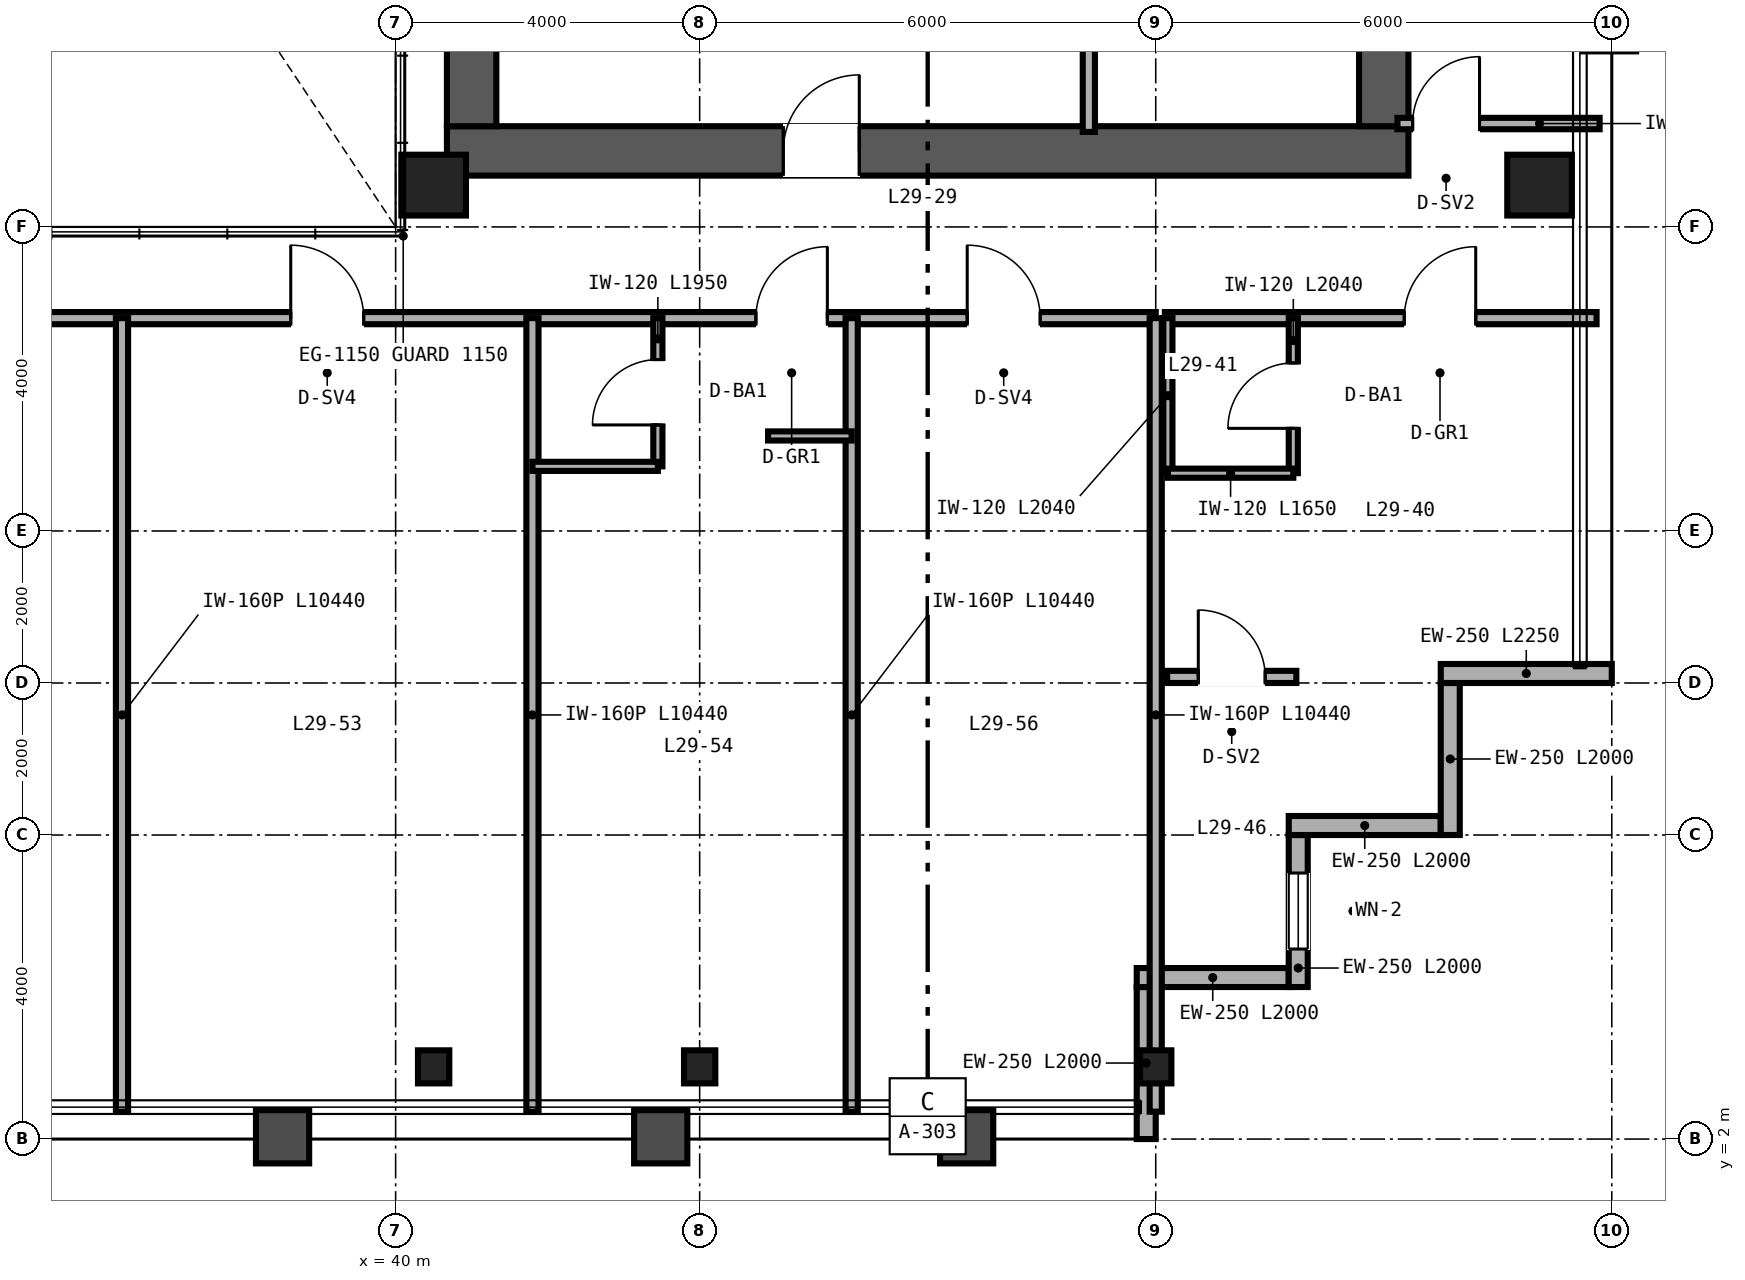
"""IFC4 building model, lengths in metres.
Left out: names, types, materials, properties, quantities, classifications, styles, units other than length and angle.
Written with IfcOpenShell. Run it as: python <this file> out.ifc"""

import sys

from ifc_helpers import new_model, si_unit, direction, frame, frame_2d, origin, origin_2d, place, context, subcontext, project, spatial, rectangle, hollow_rectangle, i_section, extrude, source, transform, mapped, element, fill, save


model = new_model("IFC4")
c1 = context("Model", 3, precision=1e-05, world=origin(), true_north=direction((0.0, 1.0)))
c2 = subcontext(c1, "Body", "Model", "MODEL_VIEW")
j1 = project(units=[si_unit("LENGTHUNIT", "METRE"), si_unit("PLANEANGLEUNIT", "RADIAN")], contexts=[c1])
p1 = place(None, origin())
s1 = spatial("IfcSite", under=j1, at=p1, CompositionType="ELEMENT")
p2 = place(p1, origin())
s2 = spatial("IfcBuilding", under=s1, at=p2, CompositionType="ELEMENT")
p3 = place(p2, frame((0.0, 0.0, 118.8)))
s3 = spatial("IfcBuildingStorey", under=s2, at=p3, CompositionType="ELEMENT", Elevation=118.8)
p4 = place(p3, frame((40.675, 15.0, 0.0), z_axis=(0.0, 0.0, 1.0), x_axis=(1.0, 0.0, 0.0)))
e1 = element("IfcWall", 1, at=p4, inside=s3, PredefinedType="SHEAR", context=c2, shape_type="SweptSolid", body=[
    extrude(rectangle(XDim=12.65, YDim=0.65, at=frame_2d((6.325, 0.0))), origin(), (0.0, 0.0, 1.0), 3.36),
])
p5 = place(p4, frame((4.425, 0.0, 0.0)))
e2 = element("IfcOpeningElement", 2, at=p5, cuts=e1, PredefinedType="OPENING", context=c2, shape_type="SweptSolid", body=[
    extrude(rectangle(XDim=1.0, YDim=2.15, at=frame_2d((0.5, 1.075))), frame((0.0, 0.335, 0.0), z_axis=(0.0, -1.0, 0.0), x_axis=(1.0, 0.0, 0.0)), (0.0, 0.0, 1.0), 0.67),
])
for number, where, z_axis, x_axis in (
    (3, (41.0, 15.325, 0.0), (0.0, 0.0, 1.0), (0.0, 1.0, 0.0)),
    (4, (53.0, 15.325, 0.0), (0.0, 0.0, 1.0), (0.0, 1.0, 0.0)),
):
    element("IfcWall", number, at=place(p3, frame(where, z_axis=z_axis, x_axis=x_axis)), inside=s3, PredefinedType="SHEAR", context=c2, shape_type="SweptSolid", body=[
        extrude(rectangle(XDim=21.35, YDim=0.65, at=frame_2d((10.675, 0.0))), origin(), (0.0, 0.0, 1.0), 3.36),
    ])
m1 = source(origin(), c2, "Body", "SweptSolid", [
    extrude(hollow_rectangle(XDim=0.85, YDim=0.8, WallThickness=0.032, at=origin_2d()), origin(), (0.0, 0.0, 1.0), 3.36),
])
for number, where, z_axis, x_axis in (
    (5, (40.5, 14.55, 0.0), (0.0, 0.0, 1.0), (1.0, 0.0, 0.0)),
    (6, (55.05, 14.55, 0.0), (0.0, 0.0, 1.0), (1.0, 0.0, 0.0)),
):
    element("IfcColumn", number, at=place(p3, frame(where, z_axis=z_axis, x_axis=x_axis)), inside=s3, PredefinedType="COLUMN", context=c2, shape_type="MappedRepresentation", body=[
        mapped(m1, transform((0.0, 0.0, 0.0), scale=1.0)),
    ])
m2 = source(origin(), c2, "Body", "SweptSolid", [
    extrude(i_section(OverallWidth=0.412, OverallDepth=0.435, WebThickness=0.036, FlangeThickness=0.057, FilletRadius=0.025, at=origin_2d()), origin(), (0.0, 0.0, 1.0), 3.36),
])
for number, where, z_axis, x_axis in (
    (7, (40.5, 2.95, 0.0), (0.0, 0.0, 1.0), (1.0, 0.0, 0.0)),
    (8, (44.0, 2.95, 0.0), (0.0, 0.0, 1.0), (1.0, 0.0, 0.0)),
    (9, (50.0, 2.95, 0.0), (0.0, 0.0, 1.0), (1.0, 0.0, 0.0)),
):
    element("IfcColumn", number, at=place(p3, frame(where, z_axis=z_axis, x_axis=x_axis)), inside=s3, PredefinedType="COLUMN", context=c2, shape_type="MappedRepresentation", body=[
        mapped(m2, transform((0.0, 0.0, 0.0), scale=1.0)),
    ])
p6 = place(p3, frame((49.875, 2.0, 0.0), z_axis=(0.0, 0.0, 1.0), x_axis=(0.0, 1.0, 0.0)))
e10 = element("IfcWall", 10, at=p6, inside=s3, PredefinedType="SOLIDWALL", context=c2, shape_type="SweptSolid", body=[
    extrude(rectangle(XDim=2.0, YDim=0.25, at=frame_2d((1.0, 0.0))), origin(), (0.0, 0.0, 1.0), 2.667),
])
p7 = place(p3, frame((49.75, 4.125, 0.0), z_axis=(0.0, 0.0, 1.0), x_axis=(1.0, 0.0, 0.0)))
e11 = element("IfcWall", 11, at=p7, inside=s3, PredefinedType="SOLIDWALL", context=c2, shape_type="SweptSolid", body=[
    extrude(rectangle(XDim=2.0, YDim=0.25, at=frame_2d((1.0, 0.0))), origin(), (0.0, 0.0, 1.0), 3.36),
])
p8 = place(p3, frame((51.875, 4.0, 0.0), z_axis=(0.0, 0.0, 1.0), x_axis=(0.0, 1.0, 0.0)))
e12 = element("IfcWall", 12, at=p8, inside=s3, PredefinedType="SOLIDWALL", context=c2, shape_type="SweptSolid", body=[
    extrude(rectangle(XDim=2.0, YDim=0.25, at=frame_2d((1.0, 0.0))), origin(), (0.0, 0.0, 1.0), 3.36),
])
p9 = place(p8, frame((0.5, 0.0, 0.85)))
e13 = element("IfcOpeningElement", 13, at=p9, cuts=e12, PredefinedType="OPENING", context=c2, shape_type="SweptSolid", body=[
    extrude(rectangle(XDim=1.0, YDim=1.9, at=frame_2d((0.5, 0.95))), frame((0.0, 0.135, 0.0), z_axis=(0.0, -1.0, 0.0), x_axis=(1.0, 0.0, 0.0)), (0.0, 0.0, 1.0), 0.27),
])
for number, where, z_axis, x_axis in (
    (14, (51.75, 6.125, 0.0), (0.0, 0.0, 1.0), (1.0, 0.0, 0.0)),
    (15, (53.875, 6.0, 0.0), (0.0, 0.0, 1.0), (0.0, 1.0, 0.0)),
):
    element("IfcWall", number, at=place(p3, frame(where, z_axis=z_axis, x_axis=x_axis)), inside=s3, PredefinedType="SOLIDWALL", context=c2, shape_type="SweptSolid", body=[
        extrude(rectangle(XDim=2.0, YDim=0.25, at=frame_2d((1.0, 0.0))), origin(), (0.0, 0.0, 1.0), 3.36),
    ])
p10 = place(p3, frame((53.75, 8.125, 0.0), z_axis=(0.0, 0.0, 1.0), x_axis=(1.0, 0.0, 0.0)))
e16 = element("IfcWall", 16, at=p10, inside=s3, PredefinedType="SOLIDWALL", context=c2, shape_type="SweptSolid", body=[
    extrude(rectangle(XDim=2.25, YDim=0.25, at=frame_2d((1.125, 0.0))), origin(), (0.0, 0.0, 1.0), 3.36),
])
p11 = place(p3, frame((49.12, 15.25, 0.0), z_axis=(0.0, 0.0, 1.0), x_axis=(0.0, 1.0, 0.0)))
e17 = element("IfcWall", 17, at=p11, inside=s3, PredefinedType="PARTITIONING", context=c2, shape_type="SweptSolid", body=[
    extrude(rectangle(XDim=16.13, YDim=0.16, at=frame_2d((8.065, 0.0))), origin(), (0.0, 0.0, 1.0), 2.36),
])
p12 = place(p11, frame((2.2, 0.0, 0.0)))
e18 = element("IfcOpeningElement", 18, at=p12, cuts=e17, PredefinedType="OPENING", context=c2, shape_type="SweptSolid", body=[
    extrude(rectangle(XDim=0.9, YDim=2.15, at=frame_2d((0.45, 1.075))), frame((0.0, 0.09, 0.0), z_axis=(0.0, -1.0, 0.0), x_axis=(1.0, 0.0, 0.0)), (0.0, 0.0, 1.0), 0.18),
])
p13 = place(p11, frame((8.2, 0.0, 0.0)))
e19 = element("IfcOpeningElement", 19, at=p13, cuts=e17, PredefinedType="OPENING", context=c2, shape_type="SweptSolid", body=[
    extrude(rectangle(XDim=0.9, YDim=2.15, at=frame_2d((0.45, 1.075))), frame((0.0, 0.09, 0.0), z_axis=(0.0, -1.0, 0.0), x_axis=(1.0, 0.0, 0.0)), (0.0, 0.0, 1.0), 0.18),
])
p14 = place(p11, frame((13.5, 0.0, 0.0)))
e20 = element("IfcOpeningElement", 20, at=p14, cuts=e17, PredefinedType="OPENING", context=c2, shape_type="SweptSolid", body=[
    extrude(rectangle(XDim=0.9, YDim=2.15, at=frame_2d((0.45, 1.075))), frame((0.0, 0.09, 0.0), z_axis=(0.0, -1.0, 0.0), x_axis=(1.0, 0.0, 0.0)), (0.0, 0.0, 1.0), 0.18),
])
p15 = place(p3, frame((53.18, 15.36, 0.0), z_axis=(0.0, 0.0, 1.0), x_axis=(1.0, 0.0, 0.0)))
e21 = element("IfcWall", 21, at=p15, inside=s3, PredefinedType="PARTITIONING", context=c2, shape_type="SweptSolid", body=[
    extrude(rectangle(XDim=2.66, YDim=0.15, at=frame_2d((1.33, 0.0))), origin(), (0.0, 0.0, 1.0), 2.581),
])
p16 = place(p15, frame((0.2, 0.0, 0.0)))
e22 = element("IfcOpeningElement", 22, at=p16, cuts=e21, PredefinedType="OPENING", context=c2, shape_type="SweptSolid", body=[
    extrude(rectangle(XDim=0.88, YDim=2.15, at=frame_2d((0.44, 1.075))), frame((0.0, 0.085, 0.0), z_axis=(0.0, -1.0, 0.0), x_axis=(1.0, 0.0, 0.0)), (0.0, 0.0, 1.0), 0.17),
])
p17 = place(p3, frame((50.12, 12.8, 0.0), z_axis=(0.0, 0.0, 1.0), x_axis=(1.0, 0.0, 0.0)))
e23 = element("IfcWall", 23, at=p17, inside=s3, PredefinedType="PARTITIONING", context=c2, shape_type="SweptSolid", body=[
    extrude(rectangle(XDim=5.68, YDim=0.16, at=frame_2d((2.84, 0.0))), origin(), (0.0, 0.0, 1.0), 3.36),
])
p18 = place(p17, frame((3.15, 0.0, 0.0)))
e24 = element("IfcOpeningElement", 24, at=p18, cuts=e23, PredefinedType="OPENING", context=c2, shape_type="SweptSolid", body=[
    extrude(rectangle(XDim=0.94, YDim=2.15, at=frame_2d((0.47, 1.075))), frame((0.0, 0.09, 0.0), z_axis=(0.0, -1.0, 0.0), x_axis=(1.0, 0.0, 0.0)), (0.0, 0.0, 1.0), 0.18),
])
p19 = place(p3, frame((51.81, 10.76, 0.0), z_axis=(0.0, 0.0, 1.0), x_axis=(0.0, 1.0, 0.0)))
e25 = element("IfcWall", 25, at=p19, inside=s3, PredefinedType="PARTITIONING", context=c2, shape_type="SweptSolid", body=[
    extrude(rectangle(XDim=2.04, YDim=0.12, at=frame_2d((1.02, 0.0))), origin(), (0.0, 0.0, 1.0), 3.36),
])
p20 = place(p19, frame((0.59, 0.0, 0.0)))
e26 = element("IfcOpeningElement", 26, at=p20, cuts=e25, PredefinedType="OPENING", context=c2, shape_type="SweptSolid", body=[
    extrude(rectangle(XDim=0.86, YDim=2.1, at=frame_2d((0.43, 1.05))), frame((0.0, 0.07, 0.0), z_axis=(0.0, -1.0, 0.0), x_axis=(1.0, 0.0, 0.0)), (0.0, 0.0, 1.0), 0.14),
])
p21 = place(p3, frame((50.16, 10.76, 0.0), z_axis=(0.0, 0.0, 1.0), x_axis=(0.0, 1.0, 0.0)))
e27 = element("IfcWall", 27, at=p21, inside=s3, PredefinedType="PARTITIONING", context=c2, shape_type="SweptSolid", body=[
    extrude(rectangle(XDim=2.04, YDim=0.12, at=frame_2d((1.02, 0.0))), origin(), (0.0, 0.0, 1.0), 3.36),
])
p22 = place(p3, frame((50.16, 10.76, 0.0), z_axis=(0.0, 0.0, 1.0), x_axis=(1.0, 0.0, 0.0)))
e28 = element("IfcWall", 28, at=p22, inside=s3, PredefinedType="PARTITIONING", context=c2, shape_type="SweptSolid", body=[
    extrude(rectangle(XDim=1.65, YDim=0.12, at=frame_2d((0.825, 0.0))), origin(), (0.0, 0.0, 1.0), 3.36),
])
p23 = place(p3, frame((50.15, 8.08, 0.0), z_axis=(0.0, 0.0, 1.0), x_axis=(1.0, 0.0, 0.0)))
e29 = element("IfcWall", 29, at=p23, inside=s3, PredefinedType="PARTITIONING", context=c2, shape_type="SweptSolid", body=[
    extrude(rectangle(XDim=1.7, YDim=0.16, at=frame_2d((0.85, 0.0))), origin(), (0.0, 0.0, 1.0), 3.36),
])
p24 = place(p23, frame((0.41, 0.0, 0.0)))
e30 = element("IfcOpeningElement", 30, at=p24, cuts=e29, PredefinedType="OPENING", context=c2, shape_type="SweptSolid", body=[
    extrude(rectangle(XDim=0.88, YDim=2.15, at=frame_2d((0.44, 1.075))), frame((0.0, 0.09, 0.0), z_axis=(0.0, -1.0, 0.0), x_axis=(1.0, 0.0, 0.0)), (0.0, 0.0, 1.0), 0.18),
])
p25 = place(p3, frame((14.0, 12.8, 0.0), z_axis=(0.0, 0.0, 1.0), x_axis=(1.0, 0.0, 0.0)))
e31 = element("IfcWall", 31, at=p25, inside=s3, PredefinedType="PARTITIONING", context=c2, shape_type="SweptSolid", body=[
    extrude(rectangle(XDim=36.0, YDim=0.16, at=frame_2d((18.0, 0.0))), origin(), (0.0, 0.0, 1.0), 2.581),
])
p26 = place(p25, frame((4.14, 0.0, 0.0)))
e32 = element("IfcOpeningElement", 32, at=p26, cuts=e31, PredefinedType="OPENING", context=c2, shape_type="SweptSolid", body=[
    extrude(rectangle(XDim=0.94, YDim=2.15, at=frame_2d((0.47, 1.075))), frame((0.0, 0.09, 0.0), z_axis=(0.0, -1.0, 0.0), x_axis=(1.0, 0.0, 0.0)), (0.0, 0.0, 1.0), 0.18),
])
p27 = place(p25, frame((9.54, 0.0, 0.0)))
e33 = element("IfcOpeningElement", 33, at=p27, cuts=e31, PredefinedType="OPENING", context=c2, shape_type="SweptSolid", body=[
    extrude(rectangle(XDim=0.94, YDim=2.15, at=frame_2d((0.47, 1.075))), frame((0.0, 0.09, 0.0), z_axis=(0.0, -1.0, 0.0), x_axis=(1.0, 0.0, 0.0)), (0.0, 0.0, 1.0), 0.18),
])
p28 = place(p25, frame((13.22, 0.0, 0.0)))
e34 = element("IfcOpeningElement", 34, at=p28, cuts=e31, PredefinedType="OPENING", context=c2, shape_type="SweptSolid", body=[
    extrude(rectangle(XDim=0.96, YDim=2.15, at=frame_2d((0.48, 1.075))), frame((0.0, 0.09, 0.0), z_axis=(0.0, -1.0, 0.0), x_axis=(1.0, 0.0, 0.0)), (0.0, 0.0, 1.0), 0.18),
])
p29 = place(p25, frame((19.02, 0.0, 0.0)))
e35 = element("IfcOpeningElement", 35, at=p29, cuts=e31, PredefinedType="OPENING", context=c2, shape_type="SweptSolid", body=[
    extrude(rectangle(XDim=0.96, YDim=2.15, at=frame_2d((0.48, 1.075))), frame((0.0, 0.09, 0.0), z_axis=(0.0, -1.0, 0.0), x_axis=(1.0, 0.0, 0.0)), (0.0, 0.0, 1.0), 0.18),
])
p30 = place(p25, frame((24.62, 0.0, 0.0)))
e36 = element("IfcOpeningElement", 36, at=p30, cuts=e31, PredefinedType="OPENING", context=c2, shape_type="SweptSolid", body=[
    extrude(rectangle(XDim=0.96, YDim=2.15, at=frame_2d((0.48, 1.075))), frame((0.0, 0.09, 0.0), z_axis=(0.0, -1.0, 0.0), x_axis=(1.0, 0.0, 0.0)), (0.0, 0.0, 1.0), 0.18),
])
p31 = place(p25, frame((30.74, 0.0, 0.0)))
e37 = element("IfcOpeningElement", 37, at=p31, cuts=e31, PredefinedType="OPENING", context=c2, shape_type="SweptSolid", body=[
    extrude(rectangle(XDim=0.94, YDim=2.15, at=frame_2d((0.47, 1.075))), frame((0.0, 0.09, 0.0), z_axis=(0.0, -1.0, 0.0), x_axis=(1.0, 0.0, 0.0)), (0.0, 0.0, 1.0), 0.18),
])
p32 = place(p25, frame((33.52, 0.0, 0.0)))
e38 = element("IfcOpeningElement", 38, at=p32, cuts=e31, PredefinedType="OPENING", context=c2, shape_type="SweptSolid", body=[
    extrude(rectangle(XDim=0.96, YDim=2.15, at=frame_2d((0.48, 1.075))), frame((0.0, 0.09, 0.0), z_axis=(0.0, -1.0, 0.0), x_axis=(1.0, 0.0, 0.0)), (0.0, 0.0, 1.0), 0.18),
])
p33 = place(p3, frame((50.0, 2.36, 0.0), z_axis=(0.0, 0.0, 1.0), x_axis=(0.0, 1.0, 0.0)))
e39 = element("IfcWall", 39, at=p33, inside=s3, PredefinedType="PARTITIONING", context=c2, shape_type="SweptSolid", body=[
    extrude(rectangle(XDim=10.44, YDim=0.16, at=frame_2d((5.22, 0.0))), origin(), (0.0, 0.0, 1.0), 2.667),
])
p34 = place(p3, frame((36.4, 2.36, 0.0), z_axis=(0.0, 0.0, 1.0), x_axis=(0.0, 1.0, 0.0)))
e40 = element("IfcWall", 40, at=p34, inside=s3, PredefinedType="PARTITIONING", context=c2, shape_type="SweptSolid", body=[
    extrude(rectangle(XDim=10.44, YDim=0.16, at=frame_2d((5.22, 0.0))), origin(), (0.0, 0.0, 1.0), 2.433),
])
p35 = place(p3, frame((41.8, 2.36, 0.0), z_axis=(0.0, 0.0, 1.0), x_axis=(0.0, 1.0, 0.0)))
e41 = element("IfcWall", 41, at=p35, inside=s3, PredefinedType="PARTITIONING", context=c2, shape_type="SweptSolid", body=[
    extrude(rectangle(XDim=10.44, YDim=0.16, at=frame_2d((5.22, 0.0))), origin(), (0.0, 0.0, 1.0), 2.823),
])
p36 = place(p3, frame((46.0, 2.36, 0.0), z_axis=(0.0, 0.0, 1.0), x_axis=(0.0, 1.0, 0.0)))
e42 = element("IfcWall", 42, at=p36, inside=s3, PredefinedType="PARTITIONING", context=c2, shape_type="SweptSolid", body=[
    extrude(rectangle(XDim=10.44, YDim=0.16, at=frame_2d((5.22, 0.0))), origin(), (0.0, 0.0, 1.0), 2.667),
])
p37 = place(p3, frame((43.45, 10.85, 0.0), z_axis=(0.0, 0.0, 1.0), x_axis=(0.0, 1.0, 0.0)))
e43 = element("IfcWall", 43, at=p37, inside=s3, PredefinedType="PARTITIONING", context=c2, shape_type="SweptSolid", body=[
    extrude(rectangle(XDim=1.95, YDim=0.12, at=frame_2d((0.975, 0.0))), origin(), (0.0, 0.0, 1.0), 3.36),
])
p38 = place(p37, frame((0.545, 0.0, 0.0)))
e44 = element("IfcOpeningElement", 44, at=p38, cuts=e43, PredefinedType="OPENING", context=c2, shape_type="SweptSolid", body=[
    extrude(rectangle(XDim=0.86, YDim=2.1, at=frame_2d((0.43, 1.05))), frame((0.0, 0.07, 0.0), z_axis=(0.0, -1.0, 0.0), x_axis=(1.0, 0.0, 0.0)), (0.0, 0.0, 1.0), 0.14),
])
p39 = place(p3, frame((41.8, 10.85, 0.0), z_axis=(0.0, 0.0, 1.0), x_axis=(1.0, 0.0, 0.0)))
e45 = element("IfcWall", 45, at=p39, inside=s3, PredefinedType="PARTITIONING", context=c2, shape_type="SweptSolid", body=[
    extrude(rectangle(XDim=1.65, YDim=0.12, at=frame_2d((0.825, 0.0))), origin(), (0.0, 0.0, 1.0), 3.36),
])
p40 = place(p3, frame((44.9, 11.25, 0.0), z_axis=(0.0, 0.0, 1.0), x_axis=(1.0, 0.0, 0.0)))
e46 = element("IfcWall", 46, at=p40, inside=s3, PredefinedType="PARTITIONING", context=c2, shape_type="SweptSolid", body=[
    extrude(rectangle(XDim=1.1, YDim=0.12, at=frame_2d((0.55, 0.0))), origin(), (0.0, 0.0, 1.0), 3.36),
])
m3 = source(origin(), c2, "Body", "SweptSolid", [
    extrude(rectangle(XDim=1.0, YDim=1.9, at=frame_2d((0.5, 0.95))), frame((0.0, 0.03, 0.0), z_axis=(0.0, -1.0, 0.0), x_axis=(1.0, 0.0, 0.0)), (0.0, 0.0, 1.0), 0.06),
])
p41 = place(p9, origin())
e47 = element("IfcWindow", 47, at=p41, inside=s3, PartitioningType="SINGLE_PANEL", PredefinedType="WINDOW", context=c2, shape_type="MappedRepresentation", body=[
    mapped(m3, transform((0.0, 0.0, 0.0), scale=1.0)),
])
fill(e13, e47)
m4 = source(origin(), c2, "Body", "SweptSolid", [
    extrude(rectangle(XDim=1.0, YDim=2.15, at=frame_2d((0.5, 1.075))), frame((0.0, 0.025, 0.0), z_axis=(0.0, -1.0, 0.0), x_axis=(1.0, 0.0, 0.0)), (0.0, 0.0, 1.0), 0.05),
])
p42 = place(p5, origin())
e48 = element("IfcDoor", 48, at=p42, inside=s3, OperationType="SINGLE_SWING_RIGHT", PredefinedType="DOOR", context=c2, shape_type="MappedRepresentation", body=[
    mapped(m4, transform((0.0, 0.0, 0.0), scale=1.0)),
])
fill(e2, e48)
m5 = source(origin(), c2, "Body", "SweptSolid", [
    extrude(rectangle(XDim=0.88, YDim=2.15, at=frame_2d((0.44, 1.075))), frame((0.0, 0.025, 0.0), z_axis=(0.0, -1.0, 0.0), x_axis=(1.0, 0.0, 0.0)), (0.0, 0.0, 1.0), 0.05),
])
p43 = place(p16, origin())
e49 = element("IfcDoor", 49, at=p43, inside=s3, OperationType="SINGLE_SWING_RIGHT", PredefinedType="DOOR", context=c2, shape_type="MappedRepresentation", body=[
    mapped(m5, transform((0.0, 0.0, 0.0), scale=1.0)),
])
fill(e22, e49)
m6 = source(origin(), c2, "Body", "SweptSolid", [
    extrude(rectangle(XDim=0.86, YDim=2.1, at=frame_2d((0.43, 1.05))), frame((0.0, 0.025, 0.0), z_axis=(0.0, -1.0, 0.0), x_axis=(1.0, 0.0, 0.0)), (0.0, 0.0, 1.0), 0.05),
])
p44 = place(p20, origin())
e50 = element("IfcDoor", 50, at=p44, inside=s3, OperationType="SINGLE_SWING_LEFT", PredefinedType="DOOR", context=c2, shape_type="MappedRepresentation", body=[
    mapped(m6, transform((0.0, 0.0, 0.0), scale=1.0)),
])
fill(e26, e50)
m7 = source(origin(), c2, "Body", "SweptSolid", [
    extrude(rectangle(XDim=0.94, YDim=2.15, at=frame_2d((0.47, 1.075))), frame((0.0, 0.025, 0.0), z_axis=(0.0, -1.0, 0.0), x_axis=(1.0, 0.0, 0.0)), (0.0, 0.0, 1.0), 0.05),
])
p45 = place(p18, origin())
e51 = element("IfcDoor", 51, at=p45, inside=s3, OperationType="SINGLE_SWING_RIGHT", PredefinedType="DOOR", context=c2, shape_type="MappedRepresentation", body=[
    mapped(m7, transform((0.0, 0.0, 0.0), scale=1.0)),
])
fill(e24, e51)
p46 = place(p24, origin())
e52 = element("IfcDoor", 52, at=p46, inside=s3, OperationType="SINGLE_SWING_LEFT", PredefinedType="DOOR", context=c2, shape_type="MappedRepresentation", body=[
    mapped(m5, transform((0.0, 0.0, 0.0), scale=1.0)),
])
fill(e30, e52)
p47 = place(p38, origin())
e53 = element("IfcDoor", 53, at=p47, inside=s3, OperationType="SINGLE_SWING_LEFT", PredefinedType="DOOR", context=c2, shape_type="MappedRepresentation", body=[
    mapped(m6, transform((0.0, 0.0, 0.0), scale=1.0)),
])
fill(e44, e53)
m8 = source(origin(), c2, "Body", "SweptSolid", [
    extrude(rectangle(XDim=0.96, YDim=2.15, at=frame_2d((0.48, 1.075))), frame((0.0, 0.025, 0.0), z_axis=(0.0, -1.0, 0.0), x_axis=(1.0, 0.0, 0.0)), (0.0, 0.0, 1.0), 0.05),
])
p48 = place(p30, origin())
e54 = element("IfcDoor", 54, at=p48, inside=s3, OperationType="SINGLE_SWING_LEFT", PredefinedType="DOOR", context=c2, shape_type="MappedRepresentation", body=[
    mapped(m8, transform((0.0, 0.0, 0.0), scale=1.0)),
])
fill(e36, e54)
p49 = place(p31, origin())
e55 = element("IfcDoor", 55, at=p49, inside=s3, OperationType="SINGLE_SWING_RIGHT", PredefinedType="DOOR", context=c2, shape_type="MappedRepresentation", body=[
    mapped(m7, transform((0.0, 0.0, 0.0), scale=1.0)),
])
fill(e37, e55)
p50 = place(p32, origin())
e56 = element("IfcDoor", 56, at=p50, inside=s3, OperationType="SINGLE_SWING_LEFT", PredefinedType="DOOR", context=c2, shape_type="MappedRepresentation", body=[
    mapped(m8, transform((0.0, 0.0, 0.0), scale=1.0)),
])
fill(e38, e56)
save(model, sys.argv[1])
